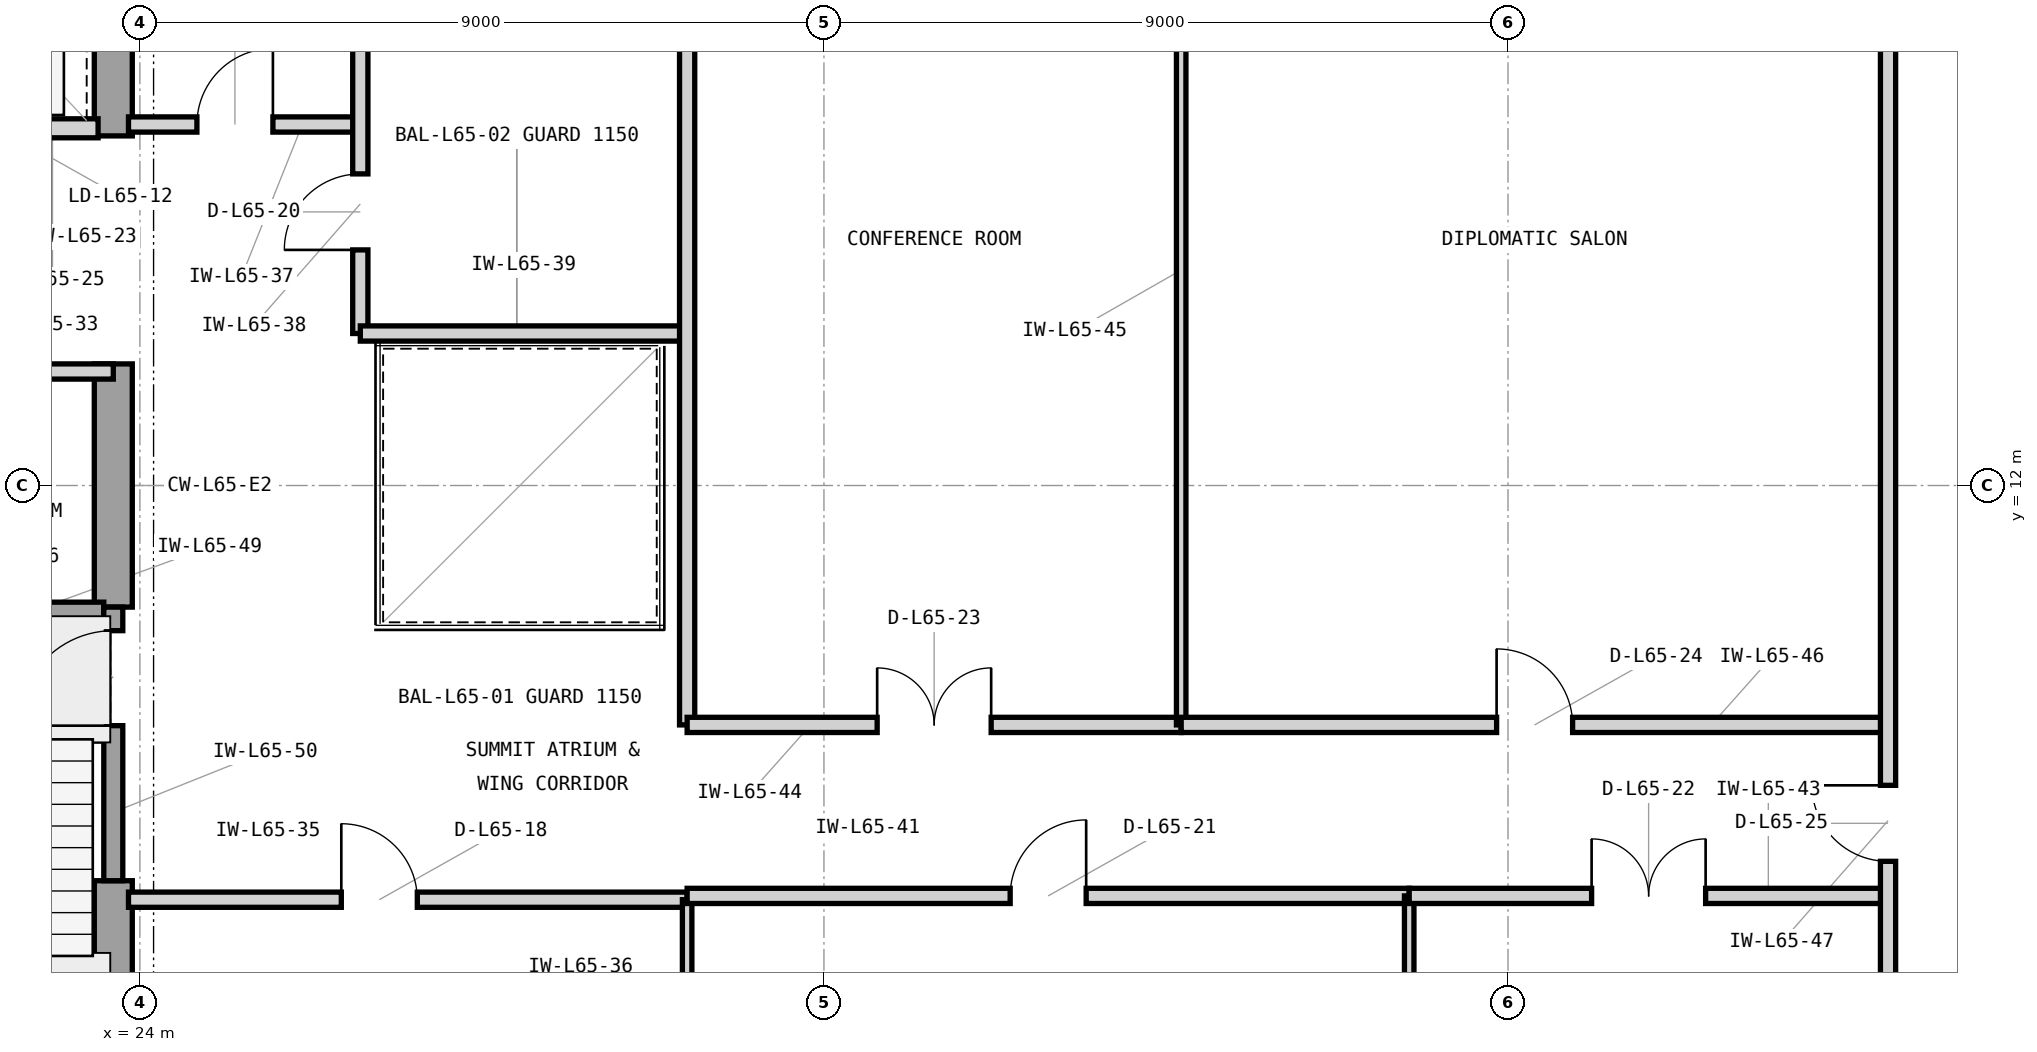
"""IFC4 building model, lengths in metres.
Left out: names, types, materials, properties, quantities, classifications, styles, units other than length and angle.
Written with IfcOpenShell. Run it as: python <this file> out.ifc"""

import sys

from ifc_helpers import new_model, si_unit, direction, frame, frame_2d, origin, place, context, subcontext, project, spatial, rectangle, extrude, element, fill, save


model = new_model("IFC4")
c1 = context("Model", 3, precision=1e-05, world=origin(), true_north=direction((0.0, 1.0)))
c2 = subcontext(c1, "Body", "Model", "MODEL_VIEW")
j1 = project(units=[si_unit("LENGTHUNIT", "METRE"), si_unit("PLANEANGLEUNIT", "RADIAN")], contexts=[c1])
p1 = place(None, origin())
s1 = spatial("IfcSite", under=j1, at=p1, CompositionType="ELEMENT")
p2 = place(p1, origin())
s2 = spatial("IfcBuilding", under=s1, at=p2, CompositionType="ELEMENT")
p3 = place(p2, frame((0.0, 0.0, 266.4)))
s3 = spatial("IfcBuildingStorey", under=s2, at=p3, CompositionType="ELEMENT", Elevation=266.4)
p4 = place(p3, frame((23.65, 3.6, 0.0), z_axis=(0.0, 0.0, 1.0), x_axis=(0.0, 1.0, 0.0)))
e1 = element("IfcWall", 1, at=p4, inside=s3, PredefinedType="SHEAR", context=c2, shape_type="SweptSolid", body=[
    extrude(rectangle(XDim=3.2, YDim=0.5, at=frame_2d((1.6, 0.0))), origin(), (0.0, 0.0, 1.0), 3.9),
])
p5 = place(p3, frame((23.65, 10.4, 0.0), z_axis=(0.0, 0.0, 1.0), x_axis=(0.0, 1.0, 0.0)))
e2 = element("IfcWall", 2, at=p5, inside=s3, PredefinedType="SHEAR", context=c2, shape_type="SweptSolid", body=[
    extrude(rectangle(XDim=3.2, YDim=0.5, at=frame_2d((1.6, 0.0))), origin(), (0.0, 0.0, 1.0), 3.9),
])
p6 = place(p3, frame((23.65, 16.6, 0.0), z_axis=(0.0, 0.0, 1.0), x_axis=(0.0, 1.0, 0.0)))
e3 = element("IfcWall", 3, at=p6, inside=s3, PredefinedType="SHEAR", context=c2, shape_type="SweptSolid", body=[
    extrude(rectangle(XDim=4.05, YDim=0.5, at=frame_2d((2.025, 0.0))), origin(), (0.0, 0.0, 1.0), 3.9),
])
p7 = place(p3, frame((21.05, 16.7, 0.0), z_axis=(0.0, 0.0, 1.0), x_axis=(1.0, 0.0, 0.0)))
e4 = element("IfcWall", 4, at=p7, inside=s3, PredefinedType="PARTITIONING", context=c2, shape_type="SweptSolid", body=[
    extrude(rectangle(XDim=2.4, YDim=0.25, at=frame_2d((1.2, 0.0))), origin(), (0.0, 0.0, 1.0), 3.088),
])
p8 = place(p7, frame((0.52, 0.0, 0.0)))
e5 = element("IfcOpeningElement", 5, at=p8, cuts=e4, PredefinedType="OPENING", context=c2, shape_type="SweptSolid", body=[
    extrude(rectangle(XDim=1.15, YDim=2.25, at=frame_2d((0.575, 1.125))), frame((0.0, 0.135, 0.0), z_axis=(0.0, -1.0, 0.0), x_axis=(1.0, 0.0, 0.0)), (0.0, 0.0, 1.0), 0.27),
])
p9 = place(p3, frame((18.5, 13.5, 0.0), z_axis=(0.0, 0.0, 1.0), x_axis=(1.0, 0.0, 0.0)))
e6 = element("IfcWall", 6, at=p9, inside=s3, PredefinedType="PARTITIONING", context=c2, shape_type="SweptSolid", body=[
    extrude(rectangle(XDim=5.15, YDim=0.2, at=frame_2d((2.575, 0.0))), origin(), (0.0, 0.0, 1.0), 3.088),
])
p10 = place(p9, frame((2.1, 0.0, 0.0)))
e7 = element("IfcOpeningElement", 7, at=p10, cuts=e6, PredefinedType="OPENING", context=c2, shape_type="SweptSolid", body=[
    extrude(rectangle(XDim=0.95, YDim=2.1, at=frame_2d((0.475, 1.05))), frame((0.0, 0.11, 0.0), z_axis=(0.0, -1.0, 0.0), x_axis=(1.0, 0.0, 0.0)), (0.0, 0.0, 1.0), 0.22),
])
p11 = place(p3, frame((23.85, 6.55, 0.0), z_axis=(0.0, 0.0, 1.0), x_axis=(1.0, 0.0, 0.0)))
e8 = element("IfcWall", 8, at=p11, inside=s3, PredefinedType="PARTITIONING", context=c2, shape_type="SweptSolid", body=[
    extrude(rectangle(XDim=7.35, YDim=0.2, at=frame_2d((3.675, 0.0))), origin(), (0.0, 0.0, 1.0), 3.705),
])
p12 = place(p11, frame((2.8, 0.0, 0.0)))
e9 = element("IfcOpeningElement", 9, at=p12, cuts=e8, PredefinedType="OPENING", context=c2, shape_type="SweptSolid", body=[
    extrude(rectangle(XDim=1.0, YDim=2.15, at=frame_2d((0.5, 1.075))), frame((0.0, 0.11, 0.0), z_axis=(0.0, -1.0, 0.0), x_axis=(1.0, 0.0, 0.0)), (0.0, 0.0, 1.0), 0.22),
])
p13 = place(p3, frame((31.2, 3.18, 0.0), z_axis=(0.0, 0.0, 1.0), x_axis=(0.0, 1.0, 0.0)))
e10 = element("IfcWall", 10, at=p13, inside=s3, PredefinedType="PARTITIONING", context=c2, shape_type="SweptSolid", body=[
    extrude(rectangle(XDim=3.37, YDim=0.125, at=frame_2d((1.685, 0.0))), origin(), (0.0, 0.0, 1.0), 3.705),
])
p14 = place(p3, frame((23.85, 16.75, 0.0), z_axis=(0.0, 0.0, 1.0), x_axis=(1.0, 0.0, 0.0)))
e11 = element("IfcWall", 11, at=p14, inside=s3, PredefinedType="PARTITIONING", context=c2, shape_type="SweptSolid", body=[
    extrude(rectangle(XDim=3.05, YDim=0.2, at=frame_2d((1.525, 0.0))), origin(), (0.0, 0.0, 1.0), 3.705),
])
p15 = place(p14, frame((0.9, 0.0, 0.0)))
e12 = element("IfcOpeningElement", 12, at=p15, cuts=e11, PredefinedType="OPENING", context=c2, shape_type="SweptSolid", body=[
    extrude(rectangle(XDim=1.0, YDim=2.15, at=frame_2d((0.5, 1.075))), frame((0.0, 0.11, 0.0), z_axis=(0.0, -1.0, 0.0), x_axis=(1.0, 0.0, 0.0)), (0.0, 0.0, 1.0), 0.22),
])
p16 = place(p3, frame((26.9, 14.0, 0.0), z_axis=(0.0, 0.0, 1.0), x_axis=(0.0, 1.0, 0.0)))
e13 = element("IfcWall", 13, at=p16, inside=s3, PredefinedType="PARTITIONING", context=c2, shape_type="SweptSolid", body=[
    extrude(rectangle(XDim=6.82, YDim=0.2, at=frame_2d((3.41, 0.0))), origin(), (0.0, 0.0, 1.0), 3.705),
])
p17 = place(p16, frame((1.1, 0.0, 0.0)))
e14 = element("IfcOpeningElement", 14, at=p17, cuts=e13, PredefinedType="OPENING", context=c2, shape_type="SweptSolid", body=[
    extrude(rectangle(XDim=1.0, YDim=2.15, at=frame_2d((0.5, 1.075))), frame((0.0, 0.11, 0.0), z_axis=(0.0, -1.0, 0.0), x_axis=(1.0, 0.0, 0.0)), (0.0, 0.0, 1.0), 0.22),
])
p18 = place(p3, frame((26.9, 14.0, 0.0), z_axis=(0.0, 0.0, 1.0), x_axis=(1.0, 0.0, 0.0)))
e15 = element("IfcWall", 15, at=p18, inside=s3, PredefinedType="PARTITIONING", context=c2, shape_type="SweptSolid", body=[
    extrude(rectangle(XDim=4.3, YDim=0.2, at=frame_2d((2.15, 0.0))), origin(), (0.0, 0.0, 1.0), 3.705),
])
p19 = place(p3, frame((31.2, 8.85, 0.0), z_axis=(0.0, 0.0, 1.0), x_axis=(0.0, 1.0, 0.0)))
e16 = element("IfcWall", 16, at=p19, inside=s3, PredefinedType="PARTITIONING", context=c2, shape_type="SweptSolid", body=[
    extrude(rectangle(XDim=11.97, YDim=0.2, at=frame_2d((5.985, 0.0))), origin(), (0.0, 0.0, 1.0), 3.705),
])
p20 = place(p3, frame((31.2, 6.6, 0.0), z_axis=(0.0, 0.0, 1.0), x_axis=(1.0, 0.0, 0.0)))
e17 = element("IfcWall", 17, at=p20, inside=s3, PredefinedType="PARTITIONING", context=c2, shape_type="SweptSolid", body=[
    extrude(rectangle(XDim=9.5, YDim=0.2, at=frame_2d((4.75, 0.0))), origin(), (0.0, 0.0, 1.0), 3.705),
])
p21 = place(p20, frame((4.25, 0.0, 0.0)))
e18 = element("IfcOpeningElement", 18, at=p21, cuts=e17, PredefinedType="OPENING", context=c2, shape_type="SweptSolid", body=[
    extrude(rectangle(XDim=1.0, YDim=2.15, at=frame_2d((0.5, 1.075))), frame((0.0, 0.11, 0.0), z_axis=(0.0, -1.0, 0.0), x_axis=(1.0, 0.0, 0.0)), (0.0, 0.0, 1.0), 0.22),
])
p22 = place(p3, frame((40.7, 3.18, 0.0), z_axis=(0.0, 0.0, 1.0), x_axis=(0.0, 1.0, 0.0)))
e19 = element("IfcWall", 19, at=p22, inside=s3, PredefinedType="PARTITIONING", context=c2, shape_type="SweptSolid", body=[
    extrude(rectangle(XDim=3.42, YDim=0.125, at=frame_2d((1.71, 0.0))), origin(), (0.0, 0.0, 1.0), 3.705),
])
p23 = place(p3, frame((40.7, 6.6, 0.0), z_axis=(0.0, 0.0, 1.0), x_axis=(1.0, 0.0, 0.0)))
e20 = element("IfcWall", 20, at=p23, inside=s3, PredefinedType="PARTITIONING", context=c2, shape_type="SweptSolid", body=[
    extrude(rectangle(XDim=6.3, YDim=0.2, at=frame_2d((3.15, 0.0))), origin(), (0.0, 0.0, 1.0), 3.705),
])
p24 = place(p23, frame((2.4, 0.0, 0.0)))
e21 = element("IfcOpeningElement", 21, at=p24, cuts=e20, PredefinedType="OPENING", context=c2, shape_type="SweptSolid", body=[
    extrude(rectangle(XDim=1.5, YDim=2.3, at=frame_2d((0.75, 1.15))), frame((0.0, 0.11, 0.0), z_axis=(0.0, -1.0, 0.0), x_axis=(1.0, 0.0, 0.0)), (0.0, 0.0, 1.0), 0.22),
])
p25 = place(p3, frame((31.2, 8.85, 0.0), z_axis=(0.0, 0.0, 1.0), x_axis=(1.0, 0.0, 0.0)))
e22 = element("IfcWall", 22, at=p25, inside=s3, PredefinedType="PARTITIONING", context=c2, shape_type="SweptSolid", body=[
    extrude(rectangle(XDim=6.5, YDim=0.2, at=frame_2d((3.25, 0.0))), origin(), (0.0, 0.0, 1.0), 3.705),
])
p26 = place(p25, frame((2.5, 0.0, 0.0)))
e23 = element("IfcOpeningElement", 23, at=p26, cuts=e22, PredefinedType="OPENING", context=c2, shape_type="SweptSolid", body=[
    extrude(rectangle(XDim=1.5, YDim=2.3, at=frame_2d((0.75, 1.15))), frame((0.0, 0.11, 0.0), z_axis=(0.0, -1.0, 0.0), x_axis=(1.0, 0.0, 0.0)), (0.0, 0.0, 1.0), 0.22),
])
p27 = place(p3, frame((37.7, 8.85, 0.0), z_axis=(0.0, 0.0, 1.0), x_axis=(0.0, 1.0, 0.0)))
e24 = element("IfcWall", 24, at=p27, inside=s3, PredefinedType="PARTITIONING", context=c2, shape_type="SweptSolid", body=[
    extrude(rectangle(XDim=11.97, YDim=0.125, at=frame_2d((5.985, 0.0))), origin(), (0.0, 0.0, 1.0), 3.705),
])
p28 = place(p3, frame((37.7, 8.85, 0.0), z_axis=(0.0, 0.0, 1.0), x_axis=(1.0, 0.0, 0.0)))
e25 = element("IfcWall", 25, at=p28, inside=s3, PredefinedType="PARTITIONING", context=c2, shape_type="SweptSolid", body=[
    extrude(rectangle(XDim=9.3, YDim=0.2, at=frame_2d((4.65, 0.0))), origin(), (0.0, 0.0, 1.0), 3.705),
])
p29 = place(p28, frame((4.15, 0.0, 0.0)))
e26 = element("IfcOpeningElement", 26, at=p29, cuts=e25, PredefinedType="OPENING", context=c2, shape_type="SweptSolid", body=[
    extrude(rectangle(XDim=1.0, YDim=2.15, at=frame_2d((0.5, 1.075))), frame((0.0, 0.11, 0.0), z_axis=(0.0, -1.0, 0.0), x_axis=(1.0, 0.0, 0.0)), (0.0, 0.0, 1.0), 0.22),
])
p30 = place(p3, frame((47.0, 3.18, 0.0), z_axis=(0.0, 0.0, 1.0), x_axis=(0.0, 1.0, 0.0)))
e27 = element("IfcWall", 27, at=p30, inside=s3, PredefinedType="PARTITIONING", context=c2, shape_type="SweptSolid", body=[
    extrude(rectangle(XDim=17.64, YDim=0.2, at=frame_2d((8.82, 0.0))), origin(), (0.0, 0.0, 1.0), 3.705),
])
p31 = place(p30, frame((3.875, 0.0, 0.0)))
e28 = element("IfcOpeningElement", 28, at=p31, cuts=e27, PredefinedType="OPENING", context=c2, shape_type="SweptSolid", body=[
    extrude(rectangle(XDim=1.0, YDim=2.15, at=frame_2d((0.5, 1.075))), frame((0.0, 0.11, 0.0), z_axis=(0.0, -1.0, 0.0), x_axis=(1.0, 0.0, 0.0)), (0.0, 0.0, 1.0), 0.22),
])
p32 = place(p3, frame((19.705, 10.34, 0.0), z_axis=(0.0, 0.0, 1.0), x_axis=(1.0, 0.0, 0.0)))
e29 = element("IfcWall", 29, at=p32, inside=s3, PredefinedType="SHEAR", context=c2, shape_type="SweptSolid", body=[
    extrude(rectangle(XDim=3.82, YDim=0.25, at=frame_2d((1.91, 0.0))), origin(), (0.0, 0.0, 1.0), 3.9),
])
p33 = place(p3, frame((23.65, 6.8, 0.0), z_axis=(0.0, 0.0, 1.0), x_axis=(0.0, 1.0, 0.0)))
e30 = element("IfcWall", 30, at=p33, inside=s3, PredefinedType="SHEAR", context=c2, shape_type="SweptSolid", body=[
    extrude(rectangle(XDim=3.6, YDim=0.25, at=frame_2d((1.8, 0.0))), origin(), (0.0, 0.0, 1.0), 3.9),
])
p34 = place(p33, frame((2.04, 0.0, 0.0)))
e31 = element("IfcOpeningElement", 31, at=p34, cuts=e30, PredefinedType="OPENING", context=c2, shape_type="SweptSolid", body=[
    extrude(rectangle(XDim=1.25, YDim=2.2, at=frame_2d((0.625, 1.1))), frame((0.0, 0.135, 0.0), z_axis=(0.0, -1.0, 0.0), x_axis=(1.0, 0.0, 0.0)), (0.0, 0.0, 1.0), 0.27),
])
p35 = place(p12, origin())
e32 = element("IfcDoor", 32, at=p35, inside=s3, OperationType="SINGLE_SWING_LEFT", PredefinedType="DOOR", context=c2, shape_type="SweptSolid", body=[
    extrude(rectangle(XDim=1.0, YDim=2.15, at=frame_2d((0.5, 1.075))), frame((0.0, 0.025, 0.0), z_axis=(0.0, -1.0, 0.0), x_axis=(1.0, 0.0, 0.0)), (0.0, 0.0, 1.0), 0.05),
])
fill(e9, e32)
p36 = place(p15, origin())
e33 = element("IfcDoor", 33, at=p36, inside=s3, OperationType="SINGLE_SWING_RIGHT", PredefinedType="DOOR", context=c2, shape_type="SweptSolid", body=[
    extrude(rectangle(XDim=1.0, YDim=2.15, at=frame_2d((0.5, 1.075))), frame((0.0, 0.025, 0.0), z_axis=(0.0, -1.0, 0.0), x_axis=(1.0, 0.0, 0.0)), (0.0, 0.0, 1.0), 0.05),
])
fill(e12, e33)
p37 = place(p17, origin())
e34 = element("IfcDoor", 34, at=p37, inside=s3, OperationType="SINGLE_SWING_LEFT", PredefinedType="DOOR", context=c2, shape_type="SweptSolid", body=[
    extrude(rectangle(XDim=1.0, YDim=2.15, at=frame_2d((0.5, 1.075))), frame((0.0, 0.025, 0.0), z_axis=(0.0, -1.0, 0.0), x_axis=(1.0, 0.0, 0.0)), (0.0, 0.0, 1.0), 0.05),
])
fill(e14, e34)
p38 = place(p21, origin())
e35 = element("IfcDoor", 35, at=p38, inside=s3, OperationType="SINGLE_SWING_RIGHT", PredefinedType="DOOR", context=c2, shape_type="SweptSolid", body=[
    extrude(rectangle(XDim=1.0, YDim=2.15, at=frame_2d((0.5, 1.075))), frame((0.0, 0.025, 0.0), z_axis=(0.0, -1.0, 0.0), x_axis=(1.0, 0.0, 0.0)), (0.0, 0.0, 1.0), 0.05),
])
fill(e18, e35)
p39 = place(p24, origin())
e36 = element("IfcDoor", 36, at=p39, inside=s3, OperationType="DOUBLE_DOOR_SINGLE_SWING", PredefinedType="DOOR", context=c2, shape_type="SweptSolid", body=[
    extrude(rectangle(XDim=1.5, YDim=2.3, at=frame_2d((0.75, 1.15))), frame((0.0, 0.025, 0.0), z_axis=(0.0, -1.0, 0.0), x_axis=(1.0, 0.0, 0.0)), (0.0, 0.0, 1.0), 0.05),
])
fill(e21, e36)
p40 = place(p26, origin())
e37 = element("IfcDoor", 37, at=p40, inside=s3, OperationType="DOUBLE_DOOR_SINGLE_SWING", PredefinedType="DOOR", context=c2, shape_type="SweptSolid", body=[
    extrude(rectangle(XDim=1.5, YDim=2.3, at=frame_2d((0.75, 1.15))), frame((0.0, 0.025, 0.0), z_axis=(0.0, -1.0, 0.0), x_axis=(1.0, 0.0, 0.0)), (0.0, 0.0, 1.0), 0.05),
])
fill(e23, e37)
p41 = place(p29, origin())
e38 = element("IfcDoor", 38, at=p41, inside=s3, OperationType="SINGLE_SWING_LEFT", PredefinedType="DOOR", context=c2, shape_type="SweptSolid", body=[
    extrude(rectangle(XDim=1.0, YDim=2.15, at=frame_2d((0.5, 1.075))), frame((0.0, 0.025, 0.0), z_axis=(0.0, -1.0, 0.0), x_axis=(1.0, 0.0, 0.0)), (0.0, 0.0, 1.0), 0.05),
])
fill(e26, e38)
p42 = place(p31, origin())
e39 = element("IfcDoor", 39, at=p42, inside=s3, OperationType="SINGLE_SWING_RIGHT", PredefinedType="DOOR", context=c2, shape_type="SweptSolid", body=[
    extrude(rectangle(XDim=1.0, YDim=2.15, at=frame_2d((0.5, 1.075))), frame((0.0, 0.025, 0.0), z_axis=(0.0, -1.0, 0.0), x_axis=(1.0, 0.0, 0.0)), (0.0, 0.0, 1.0), 0.05),
])
fill(e28, e39)
p43 = place(p34, origin())
e40 = element("IfcDoor", 40, at=p43, inside=s3, OperationType="SINGLE_SWING_LEFT", PredefinedType="DOOR", context=c2, shape_type="SweptSolid", body=[
    extrude(rectangle(XDim=1.25, YDim=2.2, at=frame_2d((0.625, 1.1))), frame((0.0, 0.025, 0.0), z_axis=(0.0, -1.0, 0.0), x_axis=(1.0, 0.0, 0.0)), (0.0, 0.0, 1.0), 0.05),
])
fill(e31, e40)
save(model, sys.argv[1])
